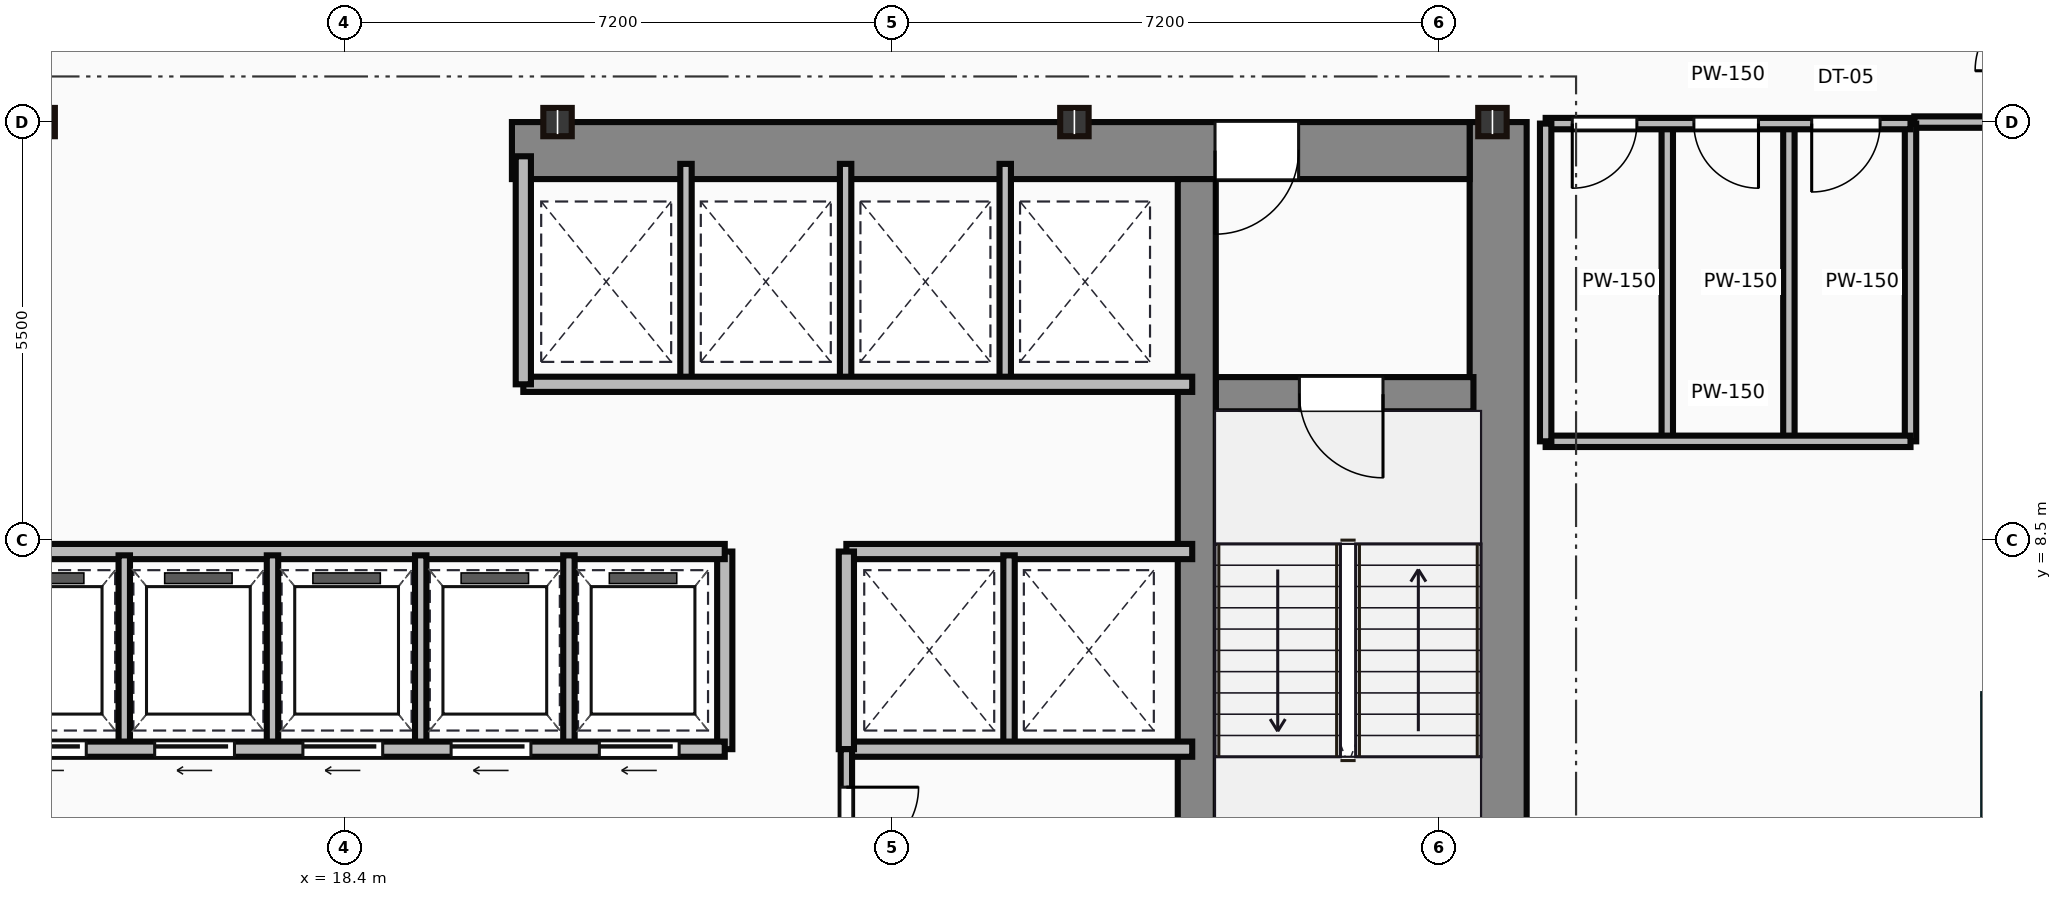
"""IFC4 building model, lengths in metres.
Left out: names, types, materials, properties, quantities, classifications, styles, units other than length and angle.
Written with IfcOpenShell. Run it as: python <this file> out.ifc"""

import sys

from ifc_helpers import new_model, si_unit, direction, frame, frame_2d, origin, origin_2d, place, context, subcontext, project, spatial, rectangle, i_section, extrude, source, transform, mapped, element, fill, save


model = new_model("IFC4")
c1 = context("Model", 3, precision=1e-05, world=origin(), true_north=direction((0.0, 1.0)))
c2 = subcontext(c1, "Body", "Model", "MODEL_VIEW")
j1 = project(units=[si_unit("LENGTHUNIT", "METRE"), si_unit("PLANEANGLEUNIT", "RADIAN")], contexts=[c1])
p1 = place(None, origin())
s1 = spatial("IfcSite", under=j1, at=p1, CompositionType="ELEMENT")
p2 = place(p1, origin())
s2 = spatial("IfcBuilding", under=s1, at=p2, CompositionType="ELEMENT")
p3 = place(p2, frame((0.0, 0.0, 158.85)))
s3 = spatial("IfcBuildingStorey", under=s2, at=p3, CompositionType="ELEMENT", Elevation=158.85)
m1 = source(origin(), c2, "Body", "SweptSolid", [
    extrude(rectangle(XDim=13.1, YDim=0.75, at=frame_2d((6.55, 0.0))), origin(), (0.0, 0.0, 1.0), 3.65),
])
p4 = place(p3, frame((33.575, 0.9, 0.0), z_axis=(0.0, 0.0, 1.0), x_axis=(0.0, 1.0, 0.0)))
e1 = element("IfcWall", 1, at=p4, inside=s3, PredefinedType="SHEAR", context=c2, shape_type="MappedRepresentation", body=[
    mapped(m1, transform((0.0, 0.0, 0.0))),
])
m2 = source(origin(), c2, "Body", "SweptSolid", [
    extrude(rectangle(XDim=12.6, YDim=0.75, at=frame_2d((6.3, 0.0))), origin(), (0.0, 0.0, 1.0), 3.65),
])
p5 = place(p3, frame((20.6, 13.625, 0.0), z_axis=(0.0, 0.0, 1.0), x_axis=(1.0, 0.0, 0.0)))
e2 = element("IfcWall", 2, at=p5, inside=s3, PredefinedType="SHEAR", context=c2, shape_type="MappedRepresentation", body=[
    mapped(m2, transform((0.0, 0.0, 0.0))),
])
p6 = place(p5, frame((9.25, 0.0, 0.0)))
e3 = element("IfcOpeningElement", 3, at=p6, cuts=e2, PredefinedType="OPENING", context=c2, shape_type="SweptSolid", body=[
    extrude(rectangle(XDim=1.1, YDim=2.15, at=frame_2d((0.55, 1.075))), frame((0.0, 0.385, 0.0), z_axis=(0.0, -1.0, 0.0), x_axis=(1.0, 0.0, 0.0)), (0.0, 0.0, 1.0), 0.77),
])
m3 = source(origin(), c2, "Body", "SweptSolid", [
    extrude(rectangle(XDim=12.35, YDim=0.5, at=frame_2d((6.175, 0.0))), origin(), (0.0, 0.0, 1.0), 3.65),
])
p7 = place(p3, frame((29.61, 0.9, 0.0), z_axis=(0.0, 0.0, 1.0), x_axis=(0.0, 1.0, 0.0)))
e4 = element("IfcWall", 4, at=p7, inside=s3, PredefinedType="SHEAR", context=c2, shape_type="MappedRepresentation", body=[
    mapped(m3, transform((0.0, 0.0, 0.0))),
])
m4 = source(origin(), c2, "Body", "SweptSolid", [
    extrude(rectangle(XDim=3.39, YDim=0.45, at=frame_2d((1.695, 0.0))), origin(), (0.0, 0.0, 1.0), 3.65),
])
p8 = place(p3, frame((29.86, 10.42, 0.0), z_axis=(0.0, 0.0, 1.0), x_axis=(1.0, 0.0, 0.0)))
e5 = element("IfcWall", 5, at=p8, inside=s3, PredefinedType="SHEAR", context=c2, shape_type="MappedRepresentation", body=[
    mapped(m4, transform((0.0, 0.0, 0.0))),
])
p9 = place(p8, frame((1.1, 0.0, 0.0)))
e6 = element("IfcOpeningElement", 6, at=p9, cuts=e5, PredefinedType="OPENING", context=c2, shape_type="SweptSolid", body=[
    extrude(rectangle(XDim=1.1, YDim=2.15, at=frame_2d((0.55, 1.075))), frame((0.0, 0.235, 0.0), z_axis=(0.0, -1.0, 0.0), x_axis=(1.0, 0.0, 0.0)), (0.0, 0.0, 1.0), 0.47),
])
m5 = source(origin(), c2, "Body", "SweptSolid", [
    extrude(i_section(OverallWidth=0.374, OverallDepth=0.372, WebThickness=0.016, FlangeThickness=0.026, at=origin_2d()), origin(), (0.0, 0.0, 1.0), 3.65),
])
for number, where, z_axis, x_axis in (
    (7, (14.4, 14.0, 0.0), (0.0, 0.0, 1.0), (1.0, 0.0, 0.0)),
    (8, (21.2, 14.0, 0.0), (0.0, 0.0, 1.0), (1.0, 0.0, 0.0)),
    (9, (28.0, 14.0, 0.0), (0.0, 0.0, 1.0), (1.0, 0.0, 0.0)),
    (10, (33.5, 14.0, 0.0), (0.0, 0.0, 1.0), (1.0, 0.0, 0.0)),
):
    element("IfcColumn", number, at=place(p3, frame(where, z_axis=z_axis, x_axis=x_axis)), inside=s3, PredefinedType="COLUMN", context=c2, shape_type="MappedRepresentation", body=[
        mapped(m5, transform((0.0, 0.0, 0.0))),
    ])
m6 = source(origin(), c2, "Body", "SweptSolid", [
    extrude(rectangle(XDim=11.85, YDim=0.2, at=frame_2d((5.925, 0.0))), origin(), (0.0, 0.0, 1.0), 3.4),
])
p10 = place(p3, frame((11.55, 5.75, 0.0), z_axis=(0.0, 0.0, 1.0), x_axis=(1.0, 0.0, 0.0)))
e11 = element("IfcWall", 11, at=p10, inside=s3, PredefinedType="PARTITIONING", context=c2, shape_type="MappedRepresentation", body=[
    mapped(m6, transform((0.0, 0.0, 0.0))),
])
p11 = place(p10, frame((0.45, 0.0, 0.0)))
e12 = element("IfcOpeningElement", 12, at=p11, cuts=e11, PredefinedType="OPENING", context=c2, shape_type="SweptSolid", body=[
    extrude(rectangle(XDim=1.05, YDim=2.15, at=frame_2d((0.525, 1.075))), frame((0.0, 0.11, 0.0), z_axis=(0.0, -1.0, 0.0), x_axis=(1.0, 0.0, 0.0)), (0.0, 0.0, 1.0), 0.22),
])
p12 = place(p10, frame((2.4, 0.0, 0.0)))
e13 = element("IfcOpeningElement", 13, at=p12, cuts=e11, PredefinedType="OPENING", context=c2, shape_type="SweptSolid", body=[
    extrude(rectangle(XDim=1.05, YDim=2.15, at=frame_2d((0.525, 1.075))), frame((0.0, 0.11, 0.0), z_axis=(0.0, -1.0, 0.0), x_axis=(1.0, 0.0, 0.0)), (0.0, 0.0, 1.0), 0.22),
])
p13 = place(p10, frame((4.35, 0.0, 0.0)))
e14 = element("IfcOpeningElement", 14, at=p13, cuts=e11, PredefinedType="OPENING", context=c2, shape_type="SweptSolid", body=[
    extrude(rectangle(XDim=1.05, YDim=2.15, at=frame_2d((0.525, 1.075))), frame((0.0, 0.11, 0.0), z_axis=(0.0, -1.0, 0.0), x_axis=(1.0, 0.0, 0.0)), (0.0, 0.0, 1.0), 0.22),
])
p14 = place(p10, frame((6.3, 0.0, 0.0)))
e15 = element("IfcOpeningElement", 15, at=p14, cuts=e11, PredefinedType="OPENING", context=c2, shape_type="SweptSolid", body=[
    extrude(rectangle(XDim=1.05, YDim=2.15, at=frame_2d((0.525, 1.075))), frame((0.0, 0.11, 0.0), z_axis=(0.0, -1.0, 0.0), x_axis=(1.0, 0.0, 0.0)), (0.0, 0.0, 1.0), 0.22),
])
p15 = place(p10, frame((8.25, 0.0, 0.0)))
e16 = element("IfcOpeningElement", 16, at=p15, cuts=e11, PredefinedType="OPENING", context=c2, shape_type="SweptSolid", body=[
    extrude(rectangle(XDim=1.05, YDim=2.15, at=frame_2d((0.525, 1.075))), frame((0.0, 0.11, 0.0), z_axis=(0.0, -1.0, 0.0), x_axis=(1.0, 0.0, 0.0)), (0.0, 0.0, 1.0), 0.22),
])
p16 = place(p10, frame((10.2, 0.0, 0.0)))
e17 = element("IfcOpeningElement", 17, at=p16, cuts=e11, PredefinedType="OPENING", context=c2, shape_type="SweptSolid", body=[
    extrude(rectangle(XDim=1.05, YDim=2.15, at=frame_2d((0.525, 1.075))), frame((0.0, 0.11, 0.0), z_axis=(0.0, -1.0, 0.0), x_axis=(1.0, 0.0, 0.0)), (0.0, 0.0, 1.0), 0.22),
])
p17 = place(p3, frame((11.55, 8.35, 0.0), z_axis=(0.0, 0.0, 1.0), x_axis=(1.0, 0.0, 0.0)))
e18 = element("IfcWall", 18, at=p17, inside=s3, PredefinedType="PARTITIONING", context=c2, shape_type="MappedRepresentation", body=[
    mapped(m6, transform((0.0, 0.0, 0.0))),
])
m7 = source(origin(), c2, "Body", "SweptSolid", [
    extrude(rectangle(XDim=2.6, YDim=0.2, at=frame_2d((1.3, 0.0))), origin(), (0.0, 0.0, 1.0), 3.4),
])
p18 = place(p3, frame((23.4, 5.75, 0.0), z_axis=(0.0, 0.0, 1.0), x_axis=(0.0, 1.0, 0.0)))
e19 = element("IfcWall", 19, at=p18, inside=s3, PredefinedType="PARTITIONING", context=c2, shape_type="MappedRepresentation", body=[
    mapped(m7, transform((0.0, 0.0, 0.0))),
])
m8 = source(origin(), c2, "Body", "SweptSolid", [
    extrude(rectangle(XDim=2.5, YDim=0.15, at=frame_2d((1.25, 0.0))), origin(), (0.0, 0.0, 1.0), 3.4),
])
for number, where, z_axis, x_axis in (
    (20, (15.5, 5.8, 0.0), (0.0, 0.0, 1.0), (0.0, 1.0, 0.0)),
    (21, (17.45, 5.8, 0.0), (0.0, 0.0, 1.0), (0.0, 1.0, 0.0)),
    (22, (19.4, 5.8, 0.0), (0.0, 0.0, 1.0), (0.0, 1.0, 0.0)),
    (23, (21.35, 5.8, 0.0), (0.0, 0.0, 1.0), (0.0, 1.0, 0.0)),
):
    element("IfcWall", number, at=place(p3, frame(where, z_axis=z_axis, x_axis=x_axis)), inside=s3, PredefinedType="PARTITIONING", context=c2, shape_type="MappedRepresentation", body=[
        mapped(m8, transform((0.0, 0.0, 0.0))),
    ])
m9 = source(origin(), c2, "Body", "SweptSolid", [
    extrude(rectangle(XDim=8.8, YDim=0.2, at=frame_2d((4.4, 0.0))), origin(), (0.0, 0.0, 1.0), 3.4),
])
p19 = place(p3, frame((20.75, 10.55, 0.0), z_axis=(0.0, 0.0, 1.0), x_axis=(1.0, 0.0, 0.0)))
e24 = element("IfcWall", 24, at=p19, inside=s3, PredefinedType="PARTITIONING", context=c2, shape_type="MappedRepresentation", body=[
    mapped(m9, transform((0.0, 0.0, 0.0))),
])
m10 = source(origin(), c2, "Body", "SweptSolid", [
    extrude(rectangle(XDim=3.0, YDim=0.2, at=frame_2d((1.5, 0.0))), origin(), (0.0, 0.0, 1.0), 3.4),
])
p20 = place(p3, frame((20.75, 10.55, 0.0), z_axis=(0.0, 0.0, 1.0), x_axis=(0.0, 1.0, 0.0)))
e25 = element("IfcWall", 25, at=p20, inside=s3, PredefinedType="PARTITIONING", context=c2, shape_type="MappedRepresentation", body=[
    mapped(m10, transform((0.0, 0.0, 0.0))),
])
m11 = source(origin(), c2, "Body", "SweptSolid", [
    extrude(rectangle(XDim=2.85, YDim=0.15, at=frame_2d((1.425, 0.0))), origin(), (0.0, 0.0, 1.0), 3.4),
])
for number, where, z_axis, x_axis in (
    (26, (22.89, 10.6, 0.0), (0.0, 0.0, 1.0), (0.0, 1.0, 0.0)),
    (27, (24.99, 10.6, 0.0), (0.0, 0.0, 1.0), (0.0, 1.0, 0.0)),
    (28, (27.09, 10.6, 0.0), (0.0, 0.0, 1.0), (0.0, 1.0, 0.0)),
):
    element("IfcWall", number, at=place(p3, frame(where, z_axis=z_axis, x_axis=x_axis)), inside=s3, PredefinedType="PARTITIONING", context=c2, shape_type="MappedRepresentation", body=[
        mapped(m11, transform((0.0, 0.0, 0.0))),
    ])
m12 = source(origin(), c2, "Body", "SweptSolid", [
    extrude(rectangle(XDim=4.55, YDim=0.2, at=frame_2d((2.275, 0.0))), origin(), (0.0, 0.0, 1.0), 3.4),
])
for number, where, z_axis, x_axis in (
    (29, (25.0, 8.35, 0.0), (0.0, 0.0, 1.0), (1.0, 0.0, 0.0)),
    (30, (25.0, 5.75, 0.0), (0.0, 0.0, 1.0), (1.0, 0.0, 0.0)),
):
    element("IfcWall", number, at=place(p3, frame(where, z_axis=z_axis, x_axis=x_axis)), inside=s3, PredefinedType="PARTITIONING", context=c2, shape_type="MappedRepresentation", body=[
        mapped(m12, transform((0.0, 0.0, 0.0))),
    ])
p21 = place(p3, frame((25.0, 5.75, 0.0), z_axis=(0.0, 0.0, 1.0), x_axis=(0.0, 1.0, 0.0)))
e31 = element("IfcWall", 31, at=p21, inside=s3, PredefinedType="PARTITIONING", context=c2, shape_type="MappedRepresentation", body=[
    mapped(m7, transform((0.0, 0.0, 0.0))),
])
p22 = place(p3, frame((27.14, 5.8, 0.0), z_axis=(0.0, 0.0, 1.0), x_axis=(0.0, 1.0, 0.0)))
e32 = element("IfcWall", 32, at=p22, inside=s3, PredefinedType="PARTITIONING", context=c2, shape_type="MappedRepresentation", body=[
    mapped(m8, transform((0.0, 0.0, 0.0))),
])
m13 = source(origin(), c2, "Body", "SweptSolid", [
    extrude(rectangle(XDim=4.9, YDim=0.15, at=frame_2d((2.45, 0.0))), origin(), (0.0, 0.0, 1.0), 3.4),
])
p23 = place(p3, frame((25.0, 0.85, 0.0), z_axis=(0.0, 0.0, 1.0), x_axis=(0.0, 1.0, 0.0)))
e33 = element("IfcWall", 33, at=p23, inside=s3, PredefinedType="PARTITIONING", context=c2, shape_type="MappedRepresentation", body=[
    mapped(m13, transform((0.0, 0.0, 0.0))),
])
p24 = place(p23, frame((1.8, 0.0, 0.0)))
e34 = element("IfcOpeningElement", 34, at=p24, cuts=e33, PredefinedType="OPENING", context=c2, shape_type="SweptSolid", body=[
    extrude(rectangle(XDim=0.95, YDim=2.15, at=frame_2d((0.475, 1.075))), frame((0.0, 0.085, 0.0), z_axis=(0.0, -1.0, 0.0), x_axis=(1.0, 0.0, 0.0)), (0.0, 0.0, 1.0), 0.17),
])
p25 = place(p23, frame((3.45, 0.0, 0.0)))
e35 = element("IfcOpeningElement", 35, at=p25, cuts=e33, PredefinedType="OPENING", context=c2, shape_type="SweptSolid", body=[
    extrude(rectangle(XDim=0.95, YDim=2.15, at=frame_2d((0.475, 1.075))), frame((0.0, 0.085, 0.0), z_axis=(0.0, -1.0, 0.0), x_axis=(1.0, 0.0, 0.0)), (0.0, 0.0, 1.0), 0.17),
])
m14 = source(origin(), c2, "Body", "SweptSolid", [
    extrude(rectangle(XDim=4.8, YDim=0.15, at=frame_2d((2.4, 0.0))), origin(), (0.0, 0.0, 1.0), 2.76),
])
p26 = place(p3, frame((34.2, 13.98, 0.0), z_axis=(0.0, 0.0, 1.0), x_axis=(1.0, 0.0, 0.0)))
e36 = element("IfcWall", 36, at=p26, inside=s3, PredefinedType="PARTITIONING", context=c2, shape_type="MappedRepresentation", body=[
    mapped(m14, transform((0.0, 0.0, 0.0))),
])
p27 = place(p26, frame((0.35, 0.0, 0.0)))
e37 = element("IfcOpeningElement", 37, at=p27, cuts=e36, PredefinedType="OPENING", context=c2, shape_type="SweptSolid", body=[
    extrude(rectangle(XDim=0.85, YDim=2.1, at=frame_2d((0.425, 1.05))), frame((0.0, 0.085, 0.0), z_axis=(0.0, -1.0, 0.0), x_axis=(1.0, 0.0, 0.0)), (0.0, 0.0, 1.0), 0.17),
])
p28 = place(p26, frame((1.95, 0.0, 0.0)))
e38 = element("IfcOpeningElement", 38, at=p28, cuts=e36, PredefinedType="OPENING", context=c2, shape_type="SweptSolid", body=[
    extrude(rectangle(XDim=0.85, YDim=2.1, at=frame_2d((0.425, 1.05))), frame((0.0, 0.085, 0.0), z_axis=(0.0, -1.0, 0.0), x_axis=(1.0, 0.0, 0.0)), (0.0, 0.0, 1.0), 0.17),
])
p29 = place(p26, frame((3.5, 0.0, 0.0)))
e39 = element("IfcOpeningElement", 39, at=p29, cuts=e36, PredefinedType="OPENING", context=c2, shape_type="SweptSolid", body=[
    extrude(rectangle(XDim=0.9, YDim=2.1, at=frame_2d((0.45, 1.05))), frame((0.0, 0.085, 0.0), z_axis=(0.0, -1.0, 0.0), x_axis=(1.0, 0.0, 0.0)), (0.0, 0.0, 1.0), 0.17),
])
m15 = source(origin(), c2, "Body", "SweptSolid", [
    extrude(rectangle(XDim=4.8, YDim=0.15, at=frame_2d((2.4, 0.0))), origin(), (0.0, 0.0, 1.0), 3.4),
])
p30 = place(p3, frame((34.2, 9.8, 0.0), z_axis=(0.0, 0.0, 1.0), x_axis=(1.0, 0.0, 0.0)))
e40 = element("IfcWall", 40, at=p30, inside=s3, PredefinedType="PARTITIONING", context=c2, shape_type="MappedRepresentation", body=[
    mapped(m15, transform((0.0, 0.0, 0.0))),
])
m16 = source(origin(), c2, "Body", "SweptSolid", [
    extrude(rectangle(XDim=4.18, YDim=0.15, at=frame_2d((2.09, 0.0))), origin(), (0.0, 0.0, 1.0), 3.4),
])
for number, where, z_axis, x_axis in (
    (41, (39.0, 9.8, 0.0), (0.0, 0.0, 1.0), (0.0, 1.0, 0.0)),
    (42, (34.2, 9.8, 0.0), (0.0, 0.0, 1.0), (0.0, 1.0, 0.0)),
    (43, (35.8, 9.8, 0.0), (0.0, 0.0, 1.0), (0.0, 1.0, 0.0)),
    (44, (37.4, 9.8, 0.0), (0.0, 0.0, 1.0), (0.0, 1.0, 0.0)),
):
    element("IfcWall", number, at=place(p3, frame(where, z_axis=z_axis, x_axis=x_axis)), inside=s3, PredefinedType="PARTITIONING", context=c2, shape_type="MappedRepresentation", body=[
        mapped(m16, transform((0.0, 0.0, 0.0))),
    ])
m17 = source(origin(), c2, "Body", "SweptSolid", [
    extrude(rectangle(XDim=1.75, YDim=0.15, at=frame_2d((0.875, 0.0))), origin(), (0.0, 0.0, 1.0), 2.76),
])
p31 = place(p3, frame((40.8, 14.0, 0.0), z_axis=(0.0, 0.0, 1.0), x_axis=(-1.0, 0.0, 0.0)))
e45 = element("IfcWall", 45, at=p31, inside=s3, PredefinedType="PARTITIONING", context=c2, shape_type="MappedRepresentation", body=[
    mapped(m17, transform((0.0, 0.0, 0.0))),
])
m18 = source(origin(), c2, "Body", "SweptSolid", [
    extrude(rectangle(XDim=1.1, YDim=2.15, at=frame_2d((0.55, 1.075))), frame((0.0, 0.025, 0.0), z_axis=(0.0, -1.0, 0.0), x_axis=(1.0, 0.0, 0.0)), (0.0, 0.0, 1.0), 0.05),
])
p32 = place(p9, frame((1.1, 0.0, 0.0), z_axis=(0.0, 0.0, 1.0), x_axis=(-1.0, 0.0, 0.0)))
e46 = element("IfcDoor", 46, at=p32, inside=s3, OperationType="SINGLE_SWING_RIGHT", PredefinedType="DOOR", context=c2, shape_type="MappedRepresentation", body=[
    mapped(m18, transform((0.0, 0.0, 0.0))),
])
fill(e6, e46)
p33 = place(p6, origin())
e47 = element("IfcDoor", 47, at=p33, inside=s3, OperationType="SINGLE_SWING_LEFT", PredefinedType="DOOR", context=c2, shape_type="MappedRepresentation", body=[
    mapped(m18, transform((0.0, 0.0, 0.0))),
])
fill(e3, e47)
m19 = source(origin(), c2, "Body", "SweptSolid", [
    extrude(rectangle(XDim=1.05, YDim=2.15, at=frame_2d((0.525, 1.075))), frame((0.0, 0.025, 0.0), z_axis=(0.0, -1.0, 0.0), x_axis=(1.0, 0.0, 0.0)), (0.0, 0.0, 1.0), 0.05),
])
p34 = place(p12, frame((1.05, 0.0, 0.0), z_axis=(0.0, 0.0, 1.0), x_axis=(-1.0, 0.0, 0.0)))
e48 = element("IfcDoor", 48, at=p34, inside=s3, OperationType="SLIDING_TO_LEFT", PredefinedType="DOOR", context=c2, shape_type="MappedRepresentation", body=[
    mapped(m19, transform((0.0, 0.0, 0.0))),
])
fill(e13, e48)
p35 = place(p13, frame((1.05, 0.0, 0.0), z_axis=(0.0, 0.0, 1.0), x_axis=(-1.0, 0.0, 0.0)))
e49 = element("IfcDoor", 49, at=p35, inside=s3, OperationType="SLIDING_TO_LEFT", PredefinedType="DOOR", context=c2, shape_type="MappedRepresentation", body=[
    mapped(m19, transform((0.0, 0.0, 0.0))),
])
fill(e14, e49)
p36 = place(p14, frame((1.05, 0.0, 0.0), z_axis=(0.0, 0.0, 1.0), x_axis=(-1.0, 0.0, 0.0)))
e50 = element("IfcDoor", 50, at=p36, inside=s3, OperationType="SLIDING_TO_LEFT", PredefinedType="DOOR", context=c2, shape_type="MappedRepresentation", body=[
    mapped(m19, transform((0.0, 0.0, 0.0))),
])
fill(e15, e50)
p37 = place(p15, frame((1.05, 0.0, 0.0), z_axis=(0.0, 0.0, 1.0), x_axis=(-1.0, 0.0, 0.0)))
e51 = element("IfcDoor", 51, at=p37, inside=s3, OperationType="SLIDING_TO_LEFT", PredefinedType="DOOR", context=c2, shape_type="MappedRepresentation", body=[
    mapped(m19, transform((0.0, 0.0, 0.0))),
])
fill(e16, e51)
p38 = place(p16, frame((1.05, 0.0, 0.0), z_axis=(0.0, 0.0, 1.0), x_axis=(-1.0, 0.0, 0.0)))
e52 = element("IfcDoor", 52, at=p38, inside=s3, OperationType="SLIDING_TO_LEFT", PredefinedType="DOOR", context=c2, shape_type="MappedRepresentation", body=[
    mapped(m19, transform((0.0, 0.0, 0.0))),
])
fill(e17, e52)
m20 = source(origin(), c2, "Body", "SweptSolid", [
    extrude(rectangle(XDim=0.95, YDim=2.15, at=frame_2d((0.475, 1.075))), frame((0.0, 0.025, 0.0), z_axis=(0.0, -1.0, 0.0), x_axis=(1.0, 0.0, 0.0)), (0.0, 0.0, 1.0), 0.05),
])
p39 = place(p25, origin())
e53 = element("IfcDoor", 53, at=p39, inside=s3, OperationType="SINGLE_SWING_RIGHT", PredefinedType="DOOR", context=c2, shape_type="MappedRepresentation", body=[
    mapped(m20, transform((0.0, 0.0, 0.0))),
])
fill(e35, e53)
m21 = source(origin(), c2, "Body", "SweptSolid", [
    extrude(rectangle(XDim=0.85, YDim=2.1, at=frame_2d((0.425, 1.05))), frame((0.0, 0.025, 0.0), z_axis=(0.0, -1.0, 0.0), x_axis=(1.0, 0.0, 0.0)), (0.0, 0.0, 1.0), 0.05),
])
p40 = place(p27, frame((0.85, 0.0, 0.0), z_axis=(0.0, 0.0, 1.0), x_axis=(-1.0, 0.0, 0.0)))
e54 = element("IfcDoor", 54, at=p40, inside=s3, OperationType="SINGLE_SWING_LEFT", PredefinedType="DOOR", context=c2, shape_type="MappedRepresentation", body=[
    mapped(m21, transform((0.0, 0.0, 0.0))),
])
fill(e37, e54)
p41 = place(p28, frame((0.85, 0.0, 0.0), z_axis=(0.0, 0.0, 1.0), x_axis=(-1.0, 0.0, 0.0)))
e55 = element("IfcDoor", 55, at=p41, inside=s3, OperationType="SINGLE_SWING_RIGHT", PredefinedType="DOOR", context=c2, shape_type="MappedRepresentation", body=[
    mapped(m21, transform((0.0, 0.0, 0.0))),
])
fill(e38, e55)
m22 = source(origin(), c2, "Body", "SweptSolid", [
    extrude(rectangle(XDim=0.9, YDim=2.1, at=frame_2d((0.45, 1.05))), frame((0.0, 0.025, 0.0), z_axis=(0.0, -1.0, 0.0), x_axis=(1.0, 0.0, 0.0)), (0.0, 0.0, 1.0), 0.05),
])
p42 = place(p29, frame((0.9, 0.0, 0.0), z_axis=(0.0, 0.0, 1.0), x_axis=(-1.0, 0.0, 0.0)))
e56 = element("IfcDoor", 56, at=p42, inside=s3, OperationType="SINGLE_SWING_LEFT", PredefinedType="DOOR", context=c2, shape_type="MappedRepresentation", body=[
    mapped(m22, transform((0.0, 0.0, 0.0))),
])
fill(e39, e56)
save(model, sys.argv[1])
